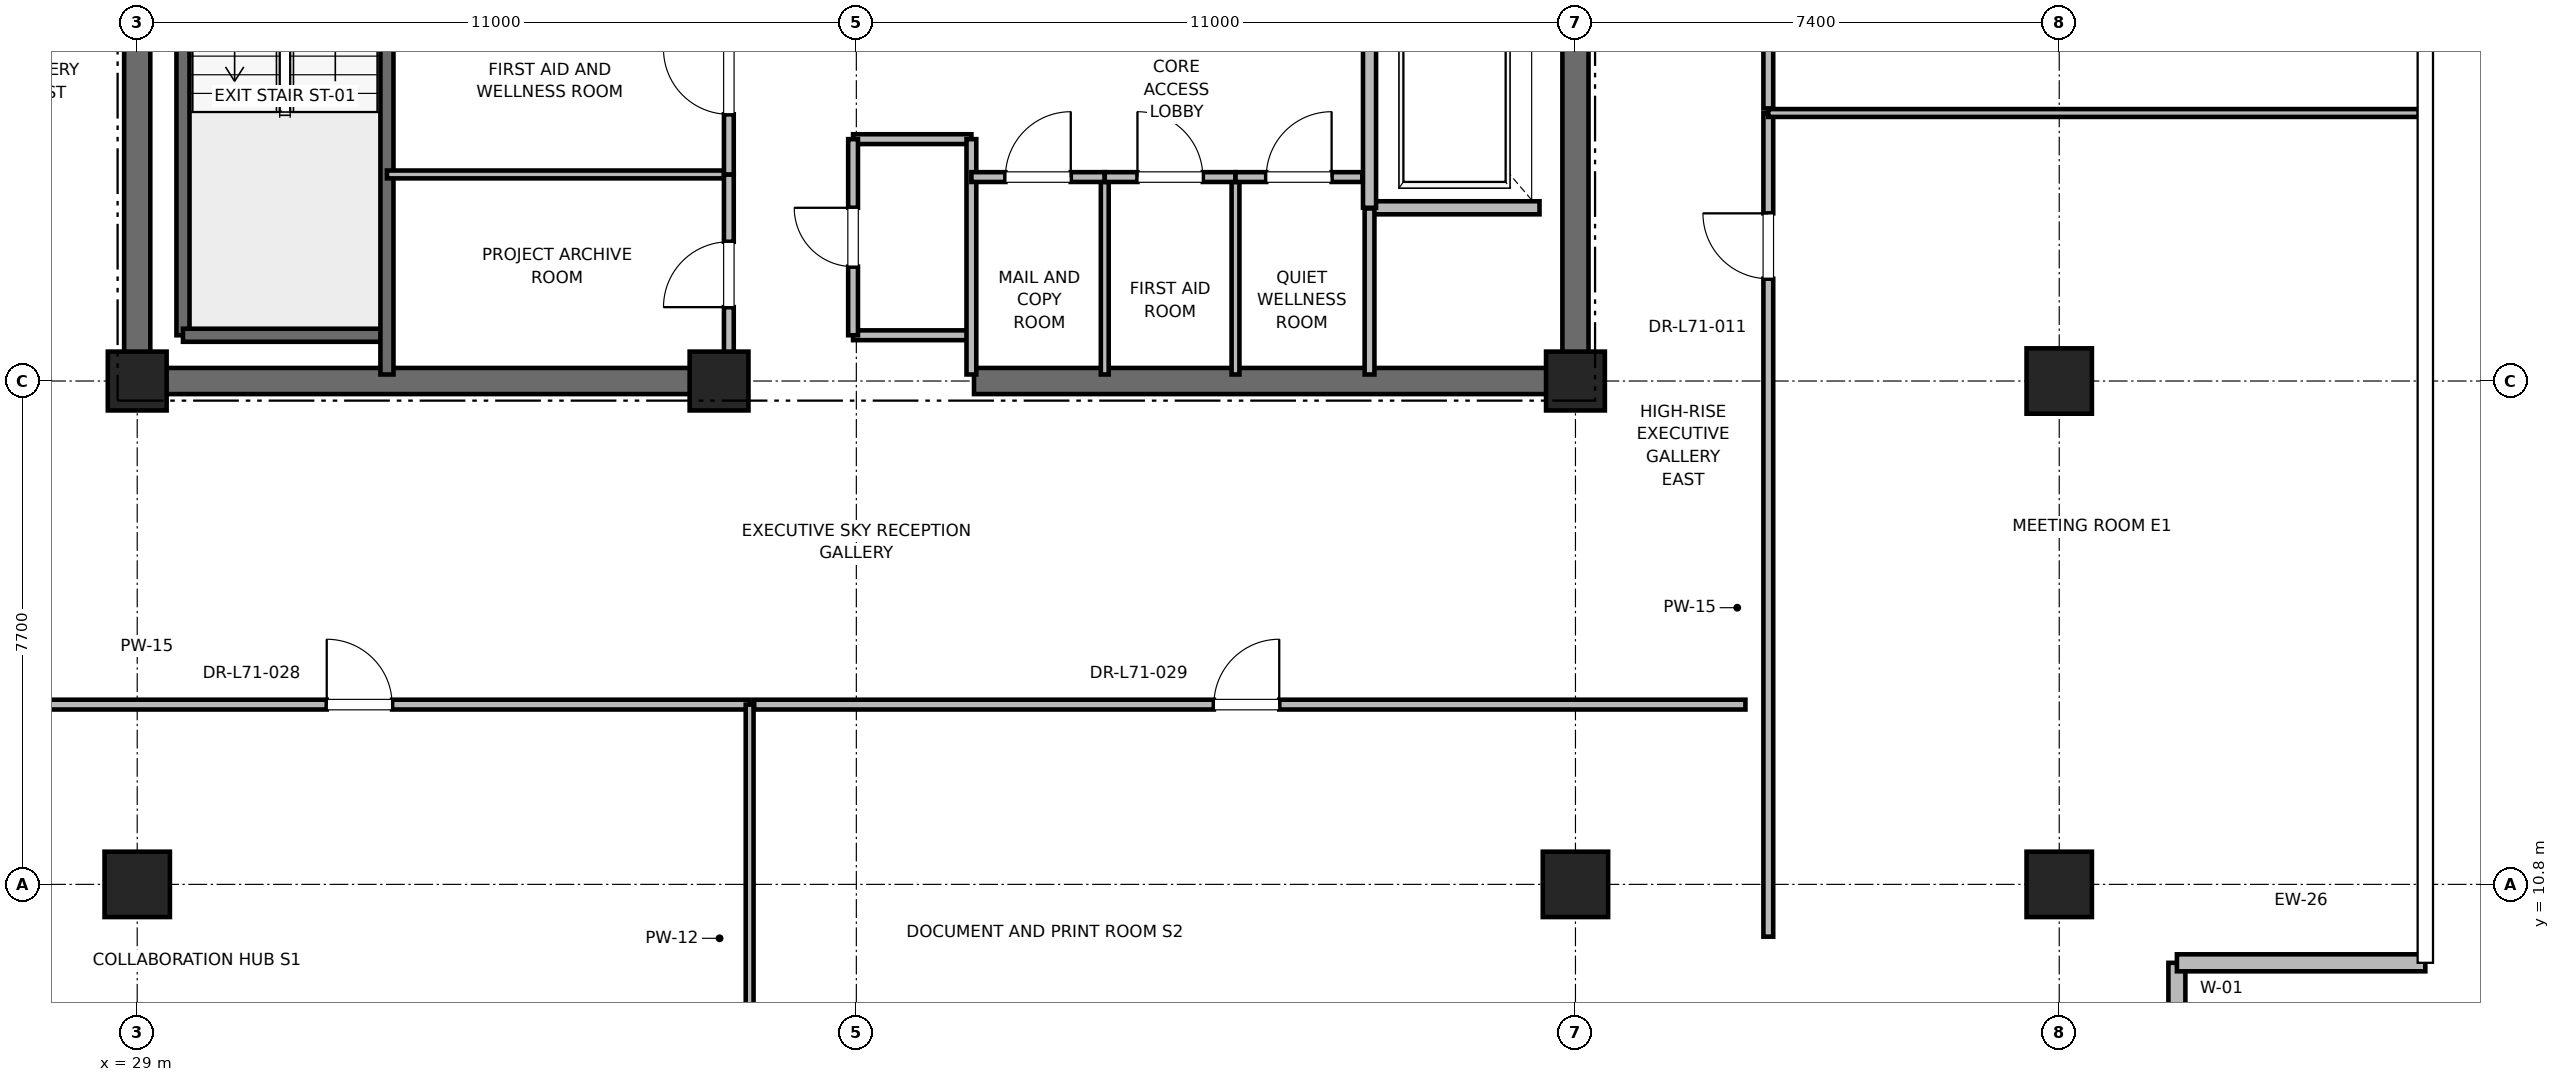
"""IFC4 building model, lengths in metres.
Left out: names, types, materials, properties, quantities, classifications, styles, units other than length and angle.
Written with IfcOpenShell. Run it as: python <this file> out.ifc"""

import sys

from ifc_helpers import new_model, si_unit, direction, frame, frame_2d, origin, origin_2d, place, context, subcontext, project, spatial, rectangle, extrude, element, fill, save


model = new_model("IFC4")
c1 = context("Model", 3, precision=1e-05, world=origin(), true_north=direction((0.0, 1.0)))
c2 = subcontext(c1, "Body", "Model", "MODEL_VIEW")
j1 = project(units=[si_unit("LENGTHUNIT", "METRE"), si_unit("PLANEANGLEUNIT", "RADIAN")], contexts=[c1])
p1 = place(None, origin())
s1 = spatial("IfcSite", under=j1, at=p1, CompositionType="ELEMENT")
p2 = place(p1, origin())
s2 = spatial("IfcBuilding", under=s1, at=p2, CompositionType="ELEMENT")
p3 = place(p2, frame((0.0, 0.0, 306.8)))
s3 = spatial("IfcBuildingStorey", under=s2, at=p3, CompositionType="ELEMENT", Elevation=306.8)
for number, where, z_axis, x_axis in (
    (1, (29.0, 10.8, 0.0), (0.0, 0.0, 1.0), (1.0, 0.0, 0.0)),
    (2, (51.0, 10.8, 0.0), (0.0, 0.0, 1.0), (1.0, 0.0, 0.0)),
    (3, (58.4, 18.5, 0.0), (0.0, 0.0, 1.0), (1.0, 0.0, 0.0)),
    (4, (58.4, 10.8, 0.0), (0.0, 0.0, 1.0), (1.0, 0.0, 0.0)),
):
    element("IfcColumn", number, at=place(p3, frame(where, z_axis=z_axis, x_axis=x_axis)), inside=s3, PredefinedType="COLUMN", context=c2, shape_type="SweptSolid", body=[
        extrude(rectangle(XDim=1.0, YDim=1.0, at=origin_2d()), origin(), (0.0, 0.0, 1.0), 4.0),
    ])
for number, where, z_axis, x_axis in (
    (5, (29.0, 18.5, 0.0), (0.0, 0.0, 1.0), (1.0, 0.0, 0.0)),
    (6, (51.0, 18.5, 0.0), (0.0, 0.0, 1.0), (1.0, 0.0, 0.0)),
    (7, (37.9, 18.5, 0.0), (0.0, 0.0, 1.0), (1.0, 0.0, 0.0)),
):
    element("IfcColumn", number, at=place(p3, frame(where, z_axis=z_axis, x_axis=x_axis)), inside=s3, PredefinedType="PILASTER", context=c2, shape_type="SweptSolid", body=[
        extrude(rectangle(XDim=0.9, YDim=0.9, at=origin_2d()), origin(), (0.0, 0.0, 1.0), 4.0),
    ])
for number, where, z_axis, x_axis in (
    (8, (29.0, 18.5, 0.0), (0.0, 0.0, 1.0), (1.0, 0.0, 0.0)),
    (9, (41.8, 18.5, 0.0), (0.0, 0.0, 1.0), (1.0, 0.0, 0.0)),
):
    element("IfcWall", number, at=place(p3, frame(where, z_axis=z_axis, x_axis=x_axis)), inside=s3, PredefinedType="SHEAR", context=c2, shape_type="SweptSolid", body=[
        extrude(rectangle(XDim=9.2, YDim=0.4, at=frame_2d((4.6, 0.0))), origin(), (0.0, 0.0, 1.0), 3.785),
    ])
p4 = place(p3, frame((29.0, 18.5, 0.0), z_axis=(0.0, 0.0, 1.0), x_axis=(0.0, 1.0, 0.0)))
e10 = element("IfcWall", 10, at=p4, inside=s3, PredefinedType="SHEAR", context=c2, shape_type="SweptSolid", body=[
    extrude(rectangle(XDim=8.8, YDim=0.4, at=frame_2d((4.4, 0.0))), origin(), (0.0, 0.0, 1.0), 3.785),
])
p5 = place(p3, frame((51.0, 18.5, 0.0), z_axis=(0.0, 0.0, 1.0), x_axis=(0.0, 1.0, 0.0)))
e11 = element("IfcWall", 11, at=p5, inside=s3, PredefinedType="SHEAR", context=c2, shape_type="SweptSolid", body=[
    extrude(rectangle(XDim=5.8, YDim=0.4, at=frame_2d((2.9, 0.0))), origin(), (0.0, 0.0, 1.0), 3.785),
])
p6 = place(p3, frame((60.2, 6.3, 0.0), z_axis=(0.0, 0.0, 1.0), x_axis=(0.0, 1.0, 0.0)))
e12 = element("IfcWall", 12, at=p6, inside=s3, PredefinedType="PARAPET", context=c2, shape_type="SweptSolid", body=[
    extrude(rectangle(XDim=3.3, YDim=0.26, at=frame_2d((1.65, 0.0))), origin(), (0.0, 0.0, 1.0), 3.785),
])
p7 = place(p6, frame((0.95, 0.0, 0.85)))
e13 = element("IfcOpeningElement", 13, at=p7, cuts=e12, PredefinedType="OPENING", context=c2, shape_type="SweptSolid", body=[
    extrude(rectangle(XDim=1.4, YDim=2.0, at=frame_2d((0.7, 1.0))), frame((0.0, 0.13, 0.0), z_axis=(0.0, -1.0, 0.0), x_axis=(1.0, 0.0, 0.0)), (0.0, 0.0, 1.0), 0.26),
])
p8 = place(p3, frame((60.2, 9.6, 0.0), z_axis=(0.0, 0.0, 1.0), x_axis=(1.0, 0.0, 0.0)))
e14 = element("IfcWall", 14, at=p8, inside=s3, PredefinedType="PARAPET", context=c2, shape_type="SweptSolid", body=[
    extrude(rectangle(XDim=3.8, YDim=0.26, at=frame_2d((1.9, 0.0))), origin(), (0.0, 0.0, 1.0), 3.785),
])
p9 = place(p3, frame((29.7, 19.2, 0.0), z_axis=(0.0, 0.0, 1.0), x_axis=(0.0, 1.0, 0.0)))
e15 = element("IfcWall", 15, at=p9, inside=s3, PredefinedType="SOLIDWALL", context=c2, shape_type="SweptSolid", body=[
    extrude(rectangle(XDim=8.15, YDim=0.2, at=frame_2d((4.075, 0.0))), origin(), (0.0, 0.0, 1.0), 3.785),
])
p10 = place(p3, frame((29.7, 19.2, 0.0), z_axis=(0.0, 0.0, 1.0), x_axis=(1.0, 0.0, 0.0)))
e16 = element("IfcWall", 16, at=p10, inside=s3, PredefinedType="SOLIDWALL", context=c2, shape_type="SweptSolid", body=[
    extrude(rectangle(XDim=3.12, YDim=0.2, at=frame_2d((1.56, 0.0))), origin(), (0.0, 0.0, 1.0), 3.785),
])
p11 = place(p3, frame((32.82, 18.6, 0.0), z_axis=(0.0, 0.0, 1.0), x_axis=(0.0, 1.0, 0.0)))
e17 = element("IfcWall", 17, at=p11, inside=s3, PredefinedType="SOLIDWALL", context=c2, shape_type="SweptSolid", body=[
    extrude(rectangle(XDim=8.78, YDim=0.2, at=frame_2d((4.39, 0.0))), origin(), (0.0, 0.0, 1.0), 3.785),
])
p12 = place(p3, frame((47.85, 21.15, 0.0), z_axis=(0.0, 0.0, 1.0), x_axis=(1.0, 0.0, 0.0)))
e18 = element("IfcWall", 18, at=p12, inside=s3, PredefinedType="SOLIDWALL", context=c2, shape_type="SweptSolid", body=[
    extrude(rectangle(XDim=2.6, YDim=0.2, at=frame_2d((1.3, 0.0))), origin(), (0.0, 0.0, 1.0), 3.785),
])
p13 = place(p3, frame((47.85, 24.15, 0.0), z_axis=(0.0, 0.0, 1.0), x_axis=(0.0, -1.0, 0.0)))
e19 = element("IfcWall", 19, at=p13, inside=s3, PredefinedType="SOLIDWALL", context=c2, shape_type="SweptSolid", body=[
    extrude(rectangle(XDim=3.0, YDim=0.2, at=frame_2d((1.5, 0.0))), origin(), (0.0, 0.0, 1.0), 3.785),
])
for number, where, z_axis, x_axis in (
    (20, (39.95, 19.2, 0.0), (0.0, 0.0, 1.0), (1.0, 0.0, 0.0)),
    (21, (39.95, 22.2, 0.0), (0.0, 0.0, 1.0), (1.0, 0.0, 0.0)),
):
    element("IfcWall", number, at=place(p3, frame(where, z_axis=z_axis, x_axis=x_axis)), inside=s3, PredefinedType="PARTITIONING", context=c2, shape_type="SweptSolid", body=[
        extrude(rectangle(XDim=1.81, YDim=0.15, at=frame_2d((0.905, 0.0))), origin(), (0.0, 0.0, 1.0), 2.85),
    ])
p14 = place(p3, frame((41.76, 18.6, 0.0), z_axis=(0.0, 0.0, 1.0), x_axis=(0.0, 1.0, 0.0)))
e22 = element("IfcWall", 22, at=p14, inside=s3, PredefinedType="PARTITIONING", context=c2, shape_type="SweptSolid", body=[
    extrude(rectangle(XDim=3.6, YDim=0.15, at=frame_2d((1.8, 0.0))), origin(), (0.0, 0.0, 1.0), 2.85),
])
p15 = place(p3, frame((39.95, 19.2, 0.0), z_axis=(0.0, 0.0, 1.0), x_axis=(0.0, 1.0, 0.0)))
e23 = element("IfcWall", 23, at=p15, inside=s3, PredefinedType="PARTITIONING", context=c2, shape_type="SweptSolid", body=[
    extrude(rectangle(XDim=3.0, YDim=0.15, at=frame_2d((1.5, 0.0))), origin(), (0.0, 0.0, 1.0), 2.85),
])
p16 = place(p15, frame((1.05, 0.0, 0.0)))
e24 = element("IfcOpeningElement", 24, at=p16, cuts=e23, PredefinedType="OPENING", context=c2, shape_type="SweptSolid", body=[
    extrude(rectangle(XDim=0.9, YDim=2.1, at=frame_2d((0.45, 1.05))), frame((0.0, 0.075, 0.0), z_axis=(0.0, -1.0, 0.0), x_axis=(1.0, 0.0, 0.0)), (0.0, 0.0, 1.0), 0.15),
])
p17 = place(p3, frame((32.82, 21.66, 0.0), z_axis=(0.0, 0.0, 1.0), x_axis=(1.0, 0.0, 0.0)))
e25 = element("IfcWall", 25, at=p17, inside=s3, PredefinedType="PARTITIONING", context=c2, shape_type="SweptSolid", body=[
    extrude(rectangle(XDim=5.23, YDim=0.12, at=frame_2d((2.615, 0.0))), origin(), (0.0, 0.0, 1.0), 2.85),
])
p18 = place(p3, frame((38.05, 18.6, 0.0), z_axis=(0.0, 0.0, 1.0), x_axis=(0.0, 1.0, 0.0)))
e26 = element("IfcWall", 26, at=p18, inside=s3, PredefinedType="PARTITIONING", context=c2, shape_type="SweptSolid", body=[
    extrude(rectangle(XDim=3.06, YDim=0.15, at=frame_2d((1.53, 0.0))), origin(), (0.0, 0.0, 1.0), 2.85),
])
p19 = place(p18, frame((1.03, 0.0, 0.0)))
e27 = element("IfcOpeningElement", 27, at=p19, cuts=e26, PredefinedType="OPENING", context=c2, shape_type="SweptSolid", body=[
    extrude(rectangle(XDim=1.0, YDim=2.15, at=frame_2d((0.5, 1.075))), frame((0.0, 0.075, 0.0), z_axis=(0.0, -1.0, 0.0), x_axis=(1.0, 0.0, 0.0)), (0.0, 0.0, 1.0), 0.15),
])
p20 = place(p3, frame((38.05, 21.66, 0.0), z_axis=(0.0, 0.0, 1.0), x_axis=(0.0, 1.0, 0.0)))
e28 = element("IfcWall", 28, at=p20, inside=s3, PredefinedType="PARTITIONING", context=c2, shape_type="SweptSolid", body=[
    extrude(rectangle(XDim=2.84, YDim=0.15, at=frame_2d((1.42, 0.0))), origin(), (0.0, 0.0, 1.0), 2.85),
])
p21 = place(p20, frame((0.92, 0.0, 0.0)))
e29 = element("IfcOpeningElement", 29, at=p21, cuts=e28, PredefinedType="OPENING", context=c2, shape_type="SweptSolid", body=[
    extrude(rectangle(XDim=1.0, YDim=2.15, at=frame_2d((0.5, 1.075))), frame((0.0, 0.075, 0.0), z_axis=(0.0, -1.0, 0.0), x_axis=(1.0, 0.0, 0.0)), (0.0, 0.0, 1.0), 0.15),
])
p22 = place(p3, frame((47.85, 18.6, 0.0), z_axis=(0.0, 0.0, 1.0), x_axis=(0.0, 1.0, 0.0)))
e30 = element("IfcWall", 30, at=p22, inside=s3, PredefinedType="PARTITIONING", context=c2, shape_type="SweptSolid", body=[
    extrude(rectangle(XDim=2.54, YDim=0.15, at=frame_2d((1.27, 0.0))), origin(), (0.0, 0.0, 1.0), 2.85),
])
for number, where, z_axis, x_axis in (
    (31, (43.8, 18.6, 0.0), (0.0, 0.0, 1.0), (0.0, 1.0, 0.0)),
    (32, (45.8, 18.6, 0.0), (0.0, 0.0, 1.0), (0.0, 1.0, 0.0)),
):
    element("IfcWall", number, at=place(p3, frame(where, z_axis=z_axis, x_axis=x_axis)), inside=s3, PredefinedType="PARTITIONING", context=c2, shape_type="SweptSolid", body=[
        extrude(rectangle(XDim=3.02, YDim=0.12, at=frame_2d((1.51, 0.0))), origin(), (0.0, 0.0, 1.0), 2.85),
    ])
p23 = place(p3, frame((41.76, 21.62, 0.0), z_axis=(0.0, 0.0, 1.0), x_axis=(1.0, 0.0, 0.0)))
e33 = element("IfcWall", 33, at=p23, inside=s3, PredefinedType="PARTITIONING", context=c2, shape_type="SweptSolid", body=[
    extrude(rectangle(XDim=2.04, YDim=0.15, at=frame_2d((1.02, 0.0))), origin(), (0.0, 0.0, 1.0), 2.85),
])
p24 = place(p23, frame((0.52, 0.0, 0.0)))
e34 = element("IfcOpeningElement", 34, at=p24, cuts=e33, PredefinedType="OPENING", context=c2, shape_type="SweptSolid", body=[
    extrude(rectangle(XDim=1.0, YDim=2.15, at=frame_2d((0.5, 1.075))), frame((0.0, 0.075, 0.0), z_axis=(0.0, -1.0, 0.0), x_axis=(1.0, 0.0, 0.0)), (0.0, 0.0, 1.0), 0.15),
])
p25 = place(p3, frame((43.8, 21.62, 0.0), z_axis=(0.0, 0.0, 1.0), x_axis=(1.0, 0.0, 0.0)))
e35 = element("IfcWall", 35, at=p25, inside=s3, PredefinedType="PARTITIONING", context=c2, shape_type="SweptSolid", body=[
    extrude(rectangle(XDim=2.0, YDim=0.15, at=frame_2d((1.0, 0.0))), origin(), (0.0, 0.0, 1.0), 2.85),
])
p26 = place(p25, frame((0.5, 0.0, 0.0)))
e36 = element("IfcOpeningElement", 36, at=p26, cuts=e35, PredefinedType="OPENING", context=c2, shape_type="SweptSolid", body=[
    extrude(rectangle(XDim=1.0, YDim=2.15, at=frame_2d((0.5, 1.075))), frame((0.0, 0.075, 0.0), z_axis=(0.0, -1.0, 0.0), x_axis=(1.0, 0.0, 0.0)), (0.0, 0.0, 1.0), 0.15),
])
p27 = place(p3, frame((45.8, 21.62, 0.0), z_axis=(0.0, 0.0, 1.0), x_axis=(1.0, 0.0, 0.0)))
e37 = element("IfcWall", 37, at=p27, inside=s3, PredefinedType="PARTITIONING", context=c2, shape_type="SweptSolid", body=[
    extrude(rectangle(XDim=1.94, YDim=0.15, at=frame_2d((0.97, 0.0))), origin(), (0.0, 0.0, 1.0), 2.85),
])
p28 = place(p27, frame((0.47, 0.0, 0.0)))
e38 = element("IfcOpeningElement", 38, at=p28, cuts=e37, PredefinedType="OPENING", context=c2, shape_type="SweptSolid", body=[
    extrude(rectangle(XDim=1.0, YDim=2.15, at=frame_2d((0.5, 1.075))), frame((0.0, 0.075, 0.0), z_axis=(0.0, -1.0, 0.0), x_axis=(1.0, 0.0, 0.0)), (0.0, 0.0, 1.0), 0.15),
])
p29 = place(p3, frame((26.4, 13.55, 0.0), z_axis=(0.0, 0.0, 1.0), x_axis=(1.0, 0.0, 0.0)))
e39 = element("IfcWall", 39, at=p29, inside=s3, PredefinedType="PARTITIONING", context=c2, shape_type="SweptSolid", body=[
    extrude(rectangle(XDim=11.968, YDim=0.15, at=frame_2d((5.984, 0.0))), origin(), (0.0, 0.0, 1.0), 2.85),
])
p30 = place(p29, frame((5.499, 0.0, 0.0)))
e40 = element("IfcOpeningElement", 40, at=p30, cuts=e39, PredefinedType="OPENING", context=c2, shape_type="SweptSolid", body=[
    extrude(rectangle(XDim=1.0, YDim=2.15, at=frame_2d((0.5, 1.075))), frame((0.0, 0.075, 0.0), z_axis=(0.0, -1.0, 0.0), x_axis=(1.0, 0.0, 0.0)), (0.0, 0.0, 1.0), 0.15),
])
p31 = place(p3, frame((38.368, 6.4, 0.0), z_axis=(0.0, 0.0, 1.0), x_axis=(0.0, 1.0, 0.0)))
e41 = element("IfcWall", 41, at=p31, inside=s3, PredefinedType="PARTITIONING", context=c2, shape_type="SweptSolid", body=[
    extrude(rectangle(XDim=7.15, YDim=0.12, at=frame_2d((3.575, 0.0))), origin(), (0.0, 0.0, 1.0), 2.415),
])
p32 = place(p3, frame((38.438, 13.55, 0.0), z_axis=(0.0, 0.0, 1.0), x_axis=(1.0, 0.0, 0.0)))
e42 = element("IfcWall", 42, at=p32, inside=s3, PredefinedType="PARTITIONING", context=c2, shape_type="SweptSolid", body=[
    extrude(rectangle(XDim=15.162, YDim=0.15, at=frame_2d((7.581, 0.0))), origin(), (0.0, 0.0, 1.0), 2.85),
])
p33 = place(p32, frame((7.031, 0.0, 0.0)))
e43 = element("IfcOpeningElement", 43, at=p33, cuts=e42, PredefinedType="OPENING", context=c2, shape_type="SweptSolid", body=[
    extrude(rectangle(XDim=1.0, YDim=2.15, at=frame_2d((0.5, 1.075))), frame((0.0, 0.075, 0.0), z_axis=(0.0, -1.0, 0.0), x_axis=(1.0, 0.0, 0.0)), (0.0, 0.0, 1.0), 0.15),
])
p34 = place(p3, frame((53.95, 10.0, 0.0), z_axis=(0.0, 0.0, 1.0), x_axis=(0.0, 1.0, 0.0)))
e44 = element("IfcWall", 44, at=p34, inside=s3, PredefinedType="PARTITIONING", context=c2, shape_type="SweptSolid", body=[
    extrude(rectangle(XDim=12.6, YDim=0.15, at=frame_2d((6.3, 0.0))), origin(), (0.0, 0.0, 1.0), 2.85),
])
p35 = place(p34, frame((10.065, 0.0, 0.0)))
e45 = element("IfcOpeningElement", 45, at=p35, cuts=e44, PredefinedType="OPENING", context=c2, shape_type="SweptSolid", body=[
    extrude(rectangle(XDim=1.0, YDim=2.15, at=frame_2d((0.5, 1.075))), frame((0.0, 0.075, 0.0), z_axis=(0.0, -1.0, 0.0), x_axis=(1.0, 0.0, 0.0)), (0.0, 0.0, 1.0), 0.15),
])
p36 = place(p3, frame((53.95, 22.6, 0.0), z_axis=(0.0, 0.0, 1.0), x_axis=(1.0, 0.0, 0.0)))
e46 = element("IfcWall", 46, at=p36, inside=s3, PredefinedType="PARTITIONING", context=c2, shape_type="SweptSolid", body=[
    extrude(rectangle(XDim=9.95, YDim=0.12, at=frame_2d((4.975, 0.0))), origin(), (0.0, 0.0, 1.0), 2.85),
])
p37 = place(p3, frame((53.95, 22.67, 0.0), z_axis=(0.0, 0.0, 1.0), x_axis=(0.0, 1.0, 0.0)))
e47 = element("IfcWall", 47, at=p37, inside=s3, PredefinedType="PARTITIONING", context=c2, shape_type="SweptSolid", body=[
    extrude(rectangle(XDim=12.18, YDim=0.15, at=frame_2d((6.09, 0.0))), origin(), (0.0, 0.0, 1.0), 2.85),
])
p38 = place(p37, frame((5.555, 0.0, 0.0)))
e48 = element("IfcOpeningElement", 48, at=p38, cuts=e47, PredefinedType="OPENING", context=c2, shape_type="SweptSolid", body=[
    extrude(rectangle(XDim=1.0, YDim=2.15, at=frame_2d((0.5, 1.075))), frame((0.0, 0.075, 0.0), z_axis=(0.0, -1.0, 0.0), x_axis=(1.0, 0.0, 0.0)), (0.0, 0.0, 1.0), 0.15),
])
p39 = place(p16, origin())
e49 = element("IfcDoor", 49, at=p39, inside=s3, OperationType="SINGLE_SWING_RIGHT", PredefinedType="DOOR", context=c2, shape_type="SweptSolid", body=[
    extrude(rectangle(XDim=0.9, YDim=2.1, at=frame_2d((0.45, 1.05))), frame((0.0, 0.025, 0.0), z_axis=(0.0, -1.0, 0.0), x_axis=(1.0, 0.0, 0.0)), (0.0, 0.0, 1.0), 0.05),
])
fill(e24, e49)
p40 = place(p19, origin())
e50 = element("IfcDoor", 50, at=p40, inside=s3, OperationType="SINGLE_SWING_LEFT", PredefinedType="DOOR", context=c2, shape_type="SweptSolid", body=[
    extrude(rectangle(XDim=1.0, YDim=2.15, at=frame_2d((0.5, 1.075))), frame((0.0, 0.025, 0.0), z_axis=(0.0, -1.0, 0.0), x_axis=(1.0, 0.0, 0.0)), (0.0, 0.0, 1.0), 0.05),
])
fill(e27, e50)
p41 = place(p21, origin())
e51 = element("IfcDoor", 51, at=p41, inside=s3, OperationType="SINGLE_SWING_RIGHT", PredefinedType="DOOR", context=c2, shape_type="SweptSolid", body=[
    extrude(rectangle(XDim=1.0, YDim=2.15, at=frame_2d((0.5, 1.075))), frame((0.0, 0.025, 0.0), z_axis=(0.0, -1.0, 0.0), x_axis=(1.0, 0.0, 0.0)), (0.0, 0.0, 1.0), 0.05),
])
fill(e29, e51)
p42 = place(p24, origin())
e52 = element("IfcDoor", 52, at=p42, inside=s3, OperationType="SINGLE_SWING_RIGHT", PredefinedType="DOOR", context=c2, shape_type="SweptSolid", body=[
    extrude(rectangle(XDim=1.0, YDim=2.15, at=frame_2d((0.5, 1.075))), frame((0.0, 0.025, 0.0), z_axis=(0.0, -1.0, 0.0), x_axis=(1.0, 0.0, 0.0)), (0.0, 0.0, 1.0), 0.05),
])
fill(e34, e52)
p43 = place(p26, origin())
e53 = element("IfcDoor", 53, at=p43, inside=s3, OperationType="SINGLE_SWING_LEFT", PredefinedType="DOOR", context=c2, shape_type="SweptSolid", body=[
    extrude(rectangle(XDim=1.0, YDim=2.15, at=frame_2d((0.5, 1.075))), frame((0.0, 0.025, 0.0), z_axis=(0.0, -1.0, 0.0), x_axis=(1.0, 0.0, 0.0)), (0.0, 0.0, 1.0), 0.05),
])
fill(e36, e53)
p44 = place(p28, origin())
e54 = element("IfcDoor", 54, at=p44, inside=s3, OperationType="SINGLE_SWING_RIGHT", PredefinedType="DOOR", context=c2, shape_type="SweptSolid", body=[
    extrude(rectangle(XDim=1.0, YDim=2.15, at=frame_2d((0.5, 1.075))), frame((0.0, 0.025, 0.0), z_axis=(0.0, -1.0, 0.0), x_axis=(1.0, 0.0, 0.0)), (0.0, 0.0, 1.0), 0.05),
])
fill(e38, e54)
p45 = place(p30, origin())
e55 = element("IfcDoor", 55, at=p45, inside=s3, OperationType="SINGLE_SWING_LEFT", PredefinedType="DOOR", context=c2, shape_type="SweptSolid", body=[
    extrude(rectangle(XDim=1.0, YDim=2.15, at=frame_2d((0.5, 1.075))), frame((0.0, 0.025, 0.0), z_axis=(0.0, -1.0, 0.0), x_axis=(1.0, 0.0, 0.0)), (0.0, 0.0, 1.0), 0.05),
])
fill(e40, e55)
p46 = place(p33, origin())
e56 = element("IfcDoor", 56, at=p46, inside=s3, OperationType="SINGLE_SWING_RIGHT", PredefinedType="DOOR", context=c2, shape_type="SweptSolid", body=[
    extrude(rectangle(XDim=1.0, YDim=2.15, at=frame_2d((0.5, 1.075))), frame((0.0, 0.025, 0.0), z_axis=(0.0, -1.0, 0.0), x_axis=(1.0, 0.0, 0.0)), (0.0, 0.0, 1.0), 0.05),
])
fill(e43, e56)
p47 = place(p35, origin())
e57 = element("IfcDoor", 57, at=p47, inside=s3, OperationType="SINGLE_SWING_RIGHT", PredefinedType="DOOR", context=c2, shape_type="SweptSolid", body=[
    extrude(rectangle(XDim=1.0, YDim=2.15, at=frame_2d((0.5, 1.075))), frame((0.0, 0.025, 0.0), z_axis=(0.0, -1.0, 0.0), x_axis=(1.0, 0.0, 0.0)), (0.0, 0.0, 1.0), 0.05),
])
fill(e45, e57)
save(model, sys.argv[1])
